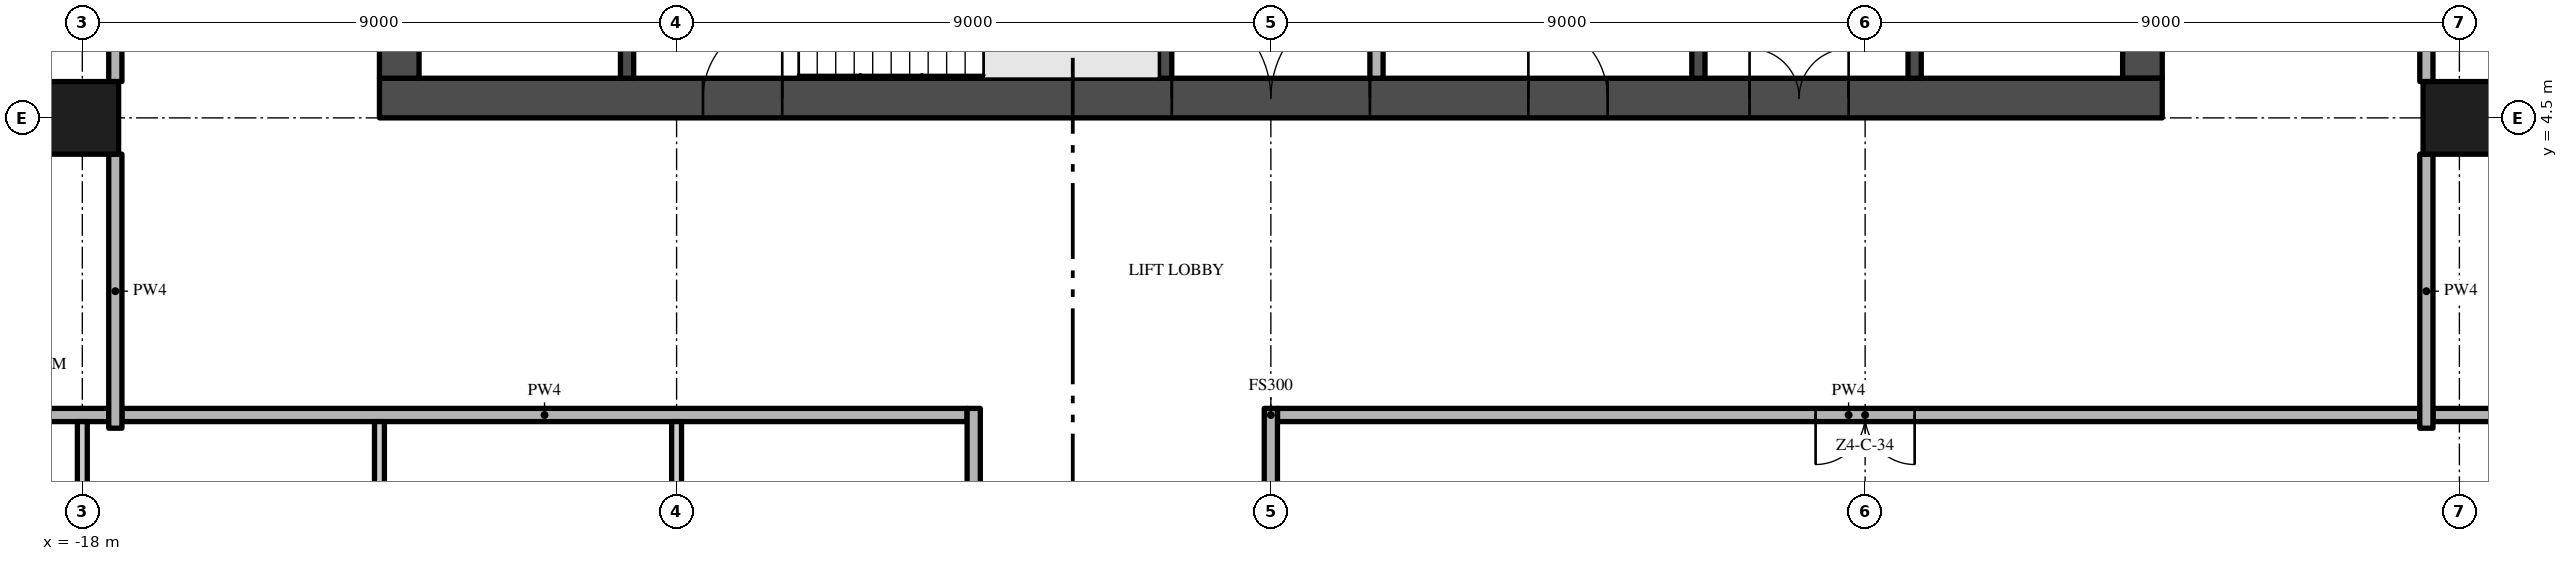
"""IFC4 building model, lengths in metres.
Left out: names, types, materials, properties, quantities, classifications, styles, units other than length and angle.
Written with IfcOpenShell. Run it as: python <this file> out.ifc"""

import sys

from ifc_helpers import new_model, si_unit, direction, frame, frame_2d, origin, origin_2d, place, context, subcontext, project, spatial, rectangle, extrude, element, fill, save


model = new_model("IFC4")
c1 = context("Model", 3, precision=1e-05, world=origin(), true_north=direction((0.0, 1.0)))
c2 = subcontext(c1, "Body", "Model", "MODEL_VIEW")
j1 = project(units=[si_unit("LENGTHUNIT", "METRE"), si_unit("PLANEANGLEUNIT", "RADIAN")], contexts=[c1])
p1 = place(None, origin())
s1 = spatial("IfcSite", under=j1, at=p1, CompositionType="ELEMENT")
p2 = place(p1, origin())
s2 = spatial("IfcBuilding", under=s1, at=p2, CompositionType="ELEMENT")
p3 = place(p2, frame((0.0, 0.0, 211.0)))
s3 = spatial("IfcBuildingStorey", under=s2, at=p3, CompositionType="ELEMENT", Elevation=211.0)
p4 = place(p3, frame((-13.5, 4.8, -0.3), z_axis=(0.0, 0.0, 1.0), x_axis=(1.0, 0.0, 0.0)))
e1 = element("IfcWall", 1, at=p4, inside=s3, PredefinedType="SHEAR", context=c2, shape_type="SweptSolid", body=[
    extrude(rectangle(XDim=27.0, YDim=0.6, at=frame_2d((13.5, 0.0))), origin(), (0.0, 0.0, 1.0), 3.8),
])
p5 = place(p4, frame((12.0, 0.0, 0.3)))
e2 = element("IfcOpeningElement", 2, at=p5, cuts=e1, PredefinedType="OPENING", context=c2, shape_type="SweptSolid", body=[
    extrude(rectangle(XDim=3.0, YDim=2.4, at=frame_2d((1.5, 1.2))), frame((0.0, 0.31, 0.0), z_axis=(0.0, -1.0, 0.0), x_axis=(1.0, 0.0, 0.0)), (0.0, 0.0, 1.0), 0.62),
])
p6 = place(p4, frame((4.9, 0.0, 0.3)))
e3 = element("IfcOpeningElement", 3, at=p6, cuts=e1, PredefinedType="OPENING", context=c2, shape_type="SweptSolid", body=[
    extrude(rectangle(XDim=1.2, YDim=2.2, at=frame_2d((0.6, 1.1))), frame((0.0, 0.31, 0.0), z_axis=(0.0, -1.0, 0.0), x_axis=(1.0, 0.0, 0.0)), (0.0, 0.0, 1.0), 0.62),
])
p7 = place(p4, frame((20.75, 0.0, 0.3)))
e4 = element("IfcOpeningElement", 4, at=p7, cuts=e1, PredefinedType="OPENING", context=c2, shape_type="SweptSolid", body=[
    extrude(rectangle(XDim=1.5, YDim=2.2, at=frame_2d((0.75, 1.1))), frame((0.0, 0.31, 0.0), z_axis=(0.0, -1.0, 0.0), x_axis=(1.0, 0.0, 0.0)), (0.0, 0.0, 1.0), 0.62),
])
p8 = place(p4, frame((17.4, 0.0, 0.3)))
e5 = element("IfcOpeningElement", 5, at=p8, cuts=e1, PredefinedType="OPENING", context=c2, shape_type="SweptSolid", body=[
    extrude(rectangle(XDim=1.2, YDim=2.2, at=frame_2d((0.6, 1.1))), frame((0.0, 0.31, 0.0), z_axis=(0.0, -1.0, 0.0), x_axis=(1.0, 0.0, 0.0)), (0.0, 0.0, 1.0), 0.62),
])
p9 = place(p3, frame((13.2, 5.1, -0.3), z_axis=(0.0, 0.0, 1.0), x_axis=(0.0, 1.0, 0.0)))
e6 = element("IfcWall", 6, at=p9, inside=s3, PredefinedType="SHEAR", context=c2, shape_type="SweptSolid", body=[
    extrude(rectangle(XDim=16.8, YDim=0.6, at=frame_2d((8.4, 0.0))), origin(), (0.0, 0.0, 1.0), 3.8),
])
p10 = place(p9, frame((6.3, 0.0, 0.3)))
e7 = element("IfcOpeningElement", 7, at=p10, cuts=e6, PredefinedType="OPENING", context=c2, shape_type="SweptSolid", body=[
    extrude(rectangle(XDim=1.2, YDim=2.2, at=frame_2d((0.6, 1.1))), frame((0.0, 0.31, 0.0), z_axis=(0.0, -1.0, 0.0), x_axis=(1.0, 0.0, 0.0)), (0.0, 0.0, 1.0), 0.62),
])
p11 = place(p3, frame((-13.2, 21.9, -0.3), z_axis=(0.0, 0.0, 1.0), x_axis=(0.0, -1.0, 0.0)))
e8 = element("IfcWall", 8, at=p11, inside=s3, PredefinedType="SHEAR", context=c2, shape_type="SweptSolid", body=[
    extrude(rectangle(XDim=16.8, YDim=0.6, at=frame_2d((8.4, 0.0))), origin(), (0.0, 0.0, 1.0), 3.8),
])
p12 = place(p11, frame((9.3, 0.0, 0.3)))
e9 = element("IfcOpeningElement", 9, at=p12, cuts=e8, PredefinedType="OPENING", context=c2, shape_type="SweptSolid", body=[
    extrude(rectangle(XDim=1.2, YDim=2.2, at=frame_2d((0.6, 1.1))), frame((0.0, 0.31, 0.0), z_axis=(0.0, -1.0, 0.0), x_axis=(1.0, 0.0, 0.0)), (0.0, 0.0, 1.0), 0.62),
])
for number, where, z_axis, x_axis in (
    (10, (-18.0, 4.5, 0.0), (0.0, 0.0, 1.0), (1.0, 0.0, 0.0)),
    (11, (18.0, 4.5, 0.0), (0.0, 0.0, 1.0), (1.0, 0.0, 0.0)),
):
    element("IfcColumn", number, at=place(p3, frame(where, z_axis=z_axis, x_axis=x_axis)), inside=s3, PredefinedType="COLUMN", context=c2, shape_type="SweptSolid", body=[
        extrude(rectangle(XDim=1.1, YDim=1.1, at=origin_2d()), origin(), (0.0, 0.0, 1.0), 3.5),
    ])
for number, where, z_axis, x_axis in (
    (12, (-9.75, 5.1, 0.0), (0.0, 0.0, 1.0), (0.0, 1.0, 0.0)),
    (13, (-1.6, 5.1, 0.0), (0.0, 0.0, 1.0), (0.0, 1.0, 0.0)),
):
    element("IfcWall", number, at=place(p3, frame(where, z_axis=z_axis, x_axis=x_axis)), inside=s3, PredefinedType="SHEAR", context=c2, shape_type="SweptSolid", body=[
        extrude(rectangle(XDim=2.85, YDim=0.2, at=frame_2d((1.425, 0.0))), origin(), (0.0, 0.0, 1.0), 3.5),
    ])
p13 = place(p3, frame((1.6, 7.5, 0.0), z_axis=(0.0, 0.0, 1.0), x_axis=(0.0, -1.0, 0.0)))
e14 = element("IfcWall", 14, at=p13, inside=s3, PredefinedType="PARTITIONING", context=c2, shape_type="SweptSolid", body=[
    extrude(rectangle(XDim=2.4, YDim=0.2, at=frame_2d((1.2, 0.0))), origin(), (0.0, 0.0, 1.0), 3.5),
])
p14 = place(p13, frame((0.35, 0.0, 0.0)))
e15 = element("IfcOpeningElement", 15, at=p14, cuts=e14, PredefinedType="OPENING", context=c2, shape_type="SweptSolid", body=[
    extrude(rectangle(XDim=0.9, YDim=2.1, at=frame_2d((0.45, 1.05))), frame((0.0, 0.11, 0.0), z_axis=(0.0, -1.0, 0.0), x_axis=(1.0, 0.0, 0.0)), (0.0, 0.0, 1.0), 0.22),
])
p15 = place(p3, frame((6.475, 5.1, 0.0), z_axis=(0.0, 0.0, 1.0), x_axis=(0.0, 1.0, 0.0)))
e16 = element("IfcWall", 16, at=p15, inside=s3, PredefinedType="SHEAR", context=c2, shape_type="SweptSolid", body=[
    extrude(rectangle(XDim=2.4, YDim=0.2, at=frame_2d((1.2, 0.0))), origin(), (0.0, 0.0, 1.0), 3.5),
])
p16 = place(p3, frame((9.75, 5.1, 0.0), z_axis=(0.0, 0.0, 1.0), x_axis=(0.0, 1.0, 0.0)))
e17 = element("IfcWall", 17, at=p16, inside=s3, PredefinedType="SHEAR", context=c2, shape_type="SweptSolid", body=[
    extrude(rectangle(XDim=2.5, YDim=0.2, at=frame_2d((1.25, 0.0))), origin(), (0.0, 0.0, 1.0), 3.5),
])
p17 = place(p16, frame((0.85, 0.0, 0.0)))
e18 = element("IfcOpeningElement", 18, at=p17, cuts=e17, PredefinedType="OPENING", context=c2, shape_type="SweptSolid", body=[
    extrude(rectangle(XDim=1.1, YDim=2.1, at=frame_2d((0.55, 1.05))), frame((0.0, 0.11, 0.0), z_axis=(0.0, -1.0, 0.0), x_axis=(1.0, 0.0, 0.0)), (0.0, 0.0, 1.0), 0.22),
])
p18 = place(p3, frame((-17.4, 0.0, 0.0), z_axis=(0.0, 0.0, 1.0), x_axis=(1.0, 0.0, 0.0)))
e19 = element("IfcWall", 19, at=p18, inside=s3, PredefinedType="PARTITIONING", context=c2, shape_type="SweptSolid", body=[
    extrude(rectangle(XDim=12.8, YDim=0.2, at=frame_2d((6.4, 0.0))), origin(), (0.0, 0.0, 1.0), 3.5),
])
p19 = place(p3, frame((17.4, 0.0, 0.0), z_axis=(0.0, 0.0, 1.0), x_axis=(-1.0, 0.0, 0.0)))
e20 = element("IfcWall", 20, at=p19, inside=s3, PredefinedType="PARTITIONING", context=c2, shape_type="SweptSolid", body=[
    extrude(rectangle(XDim=17.3, YDim=0.2, at=frame_2d((8.65, 0.0))), origin(), (0.0, 0.0, 1.0), 3.5),
])
p20 = place(p19, frame((7.65, 0.0, 0.0)))
e21 = element("IfcOpeningElement", 21, at=p20, cuts=e20, PredefinedType="OPENING", context=c2, shape_type="SweptSolid", body=[
    extrude(rectangle(XDim=1.5, YDim=2.4, at=frame_2d((0.75, 1.2))), frame((0.0, 0.11, 0.0), z_axis=(0.0, -1.0, 0.0), x_axis=(1.0, 0.0, 0.0)), (0.0, 0.0, 1.0), 0.22),
])
for number, where, z_axis, x_axis in (
    (22, (-26.7, 0.0, 0.0), (0.0, 0.0, 1.0), (1.0, 0.0, 0.0)),
    (23, (17.6, 0.0, 0.0), (0.0, 0.0, 1.0), (1.0, 0.0, 0.0)),
):
    element("IfcWall", number, at=place(p3, frame(where, z_axis=z_axis, x_axis=x_axis)), inside=s3, PredefinedType="PARTITIONING", context=c2, shape_type="SweptSolid", body=[
        extrude(rectangle(XDim=9.1, YDim=0.2, at=frame_2d((4.55, 0.0))), origin(), (0.0, 0.0, 1.0), 3.5),
    ])
p21 = place(p3, frame((-18.0, -3.95, 0.0), z_axis=(0.0, 0.0, 1.0), x_axis=(0.0, 1.0, 0.0)))
e24 = element("IfcWall", 24, at=p21, inside=s3, PredefinedType="PARTITIONING", context=c2, shape_type="SweptSolid", body=[
    extrude(rectangle(XDim=3.85, YDim=0.15, at=frame_2d((1.925, 0.0))), origin(), (0.0, 0.0, 1.0), 3.5),
])
p22 = place(p21, frame((0.15, 0.0, 0.0)))
e25 = element("IfcOpeningElement", 25, at=p22, cuts=e24, PredefinedType="OPENING", context=c2, shape_type="SweptSolid", body=[
    extrude(rectangle(XDim=1.0, YDim=2.4, at=frame_2d((0.5, 1.2))), frame((0.0, 0.085, 0.0), z_axis=(0.0, -1.0, 0.0), x_axis=(1.0, 0.0, 0.0)), (0.0, 0.0, 1.0), 0.17),
])
p23 = place(p3, frame((-17.5, -0.2, 0.0), z_axis=(0.0, 0.0, 1.0), x_axis=(0.0, 1.0, 0.0)))
e26 = element("IfcWall", 26, at=p23, inside=s3, PredefinedType="PARTITIONING", context=c2, shape_type="SweptSolid", body=[
    extrude(rectangle(XDim=4.15, YDim=0.2, at=frame_2d((2.075, 0.0))), origin(), (0.0, 0.0, 1.0), 3.5),
])
p24 = place(p3, frame((-17.5, 5.05, 0.0), z_axis=(0.0, 0.0, 1.0), x_axis=(0.0, 1.0, 0.0)))
e27 = element("IfcWall", 27, at=p24, inside=s3, PredefinedType="PARTITIONING", context=c2, shape_type="SweptSolid", body=[
    extrude(rectangle(XDim=7.9, YDim=0.2, at=frame_2d((3.95, 0.0))), origin(), (0.0, 0.0, 1.0), 3.5),
])
p25 = place(p3, frame((-13.5, -8.325, 0.0), z_axis=(0.0, 0.0, 1.0), x_axis=(0.0, 1.0, 0.0)))
e28 = element("IfcWall", 28, at=p25, inside=s3, PredefinedType="PARTITIONING", context=c2, shape_type="SweptSolid", body=[
    extrude(rectangle(XDim=8.225, YDim=0.15, at=frame_2d((4.112, 0.0))), origin(), (0.0, 0.0, 1.0), 3.5),
])
p26 = place(p3, frame((-9.0, -3.95, 0.0), z_axis=(0.0, 0.0, 1.0), x_axis=(0.0, 1.0, 0.0)))
e29 = element("IfcWall", 29, at=p26, inside=s3, PredefinedType="PARTITIONING", context=c2, shape_type="SweptSolid", body=[
    extrude(rectangle(XDim=3.85, YDim=0.15, at=frame_2d((1.925, 0.0))), origin(), (0.0, 0.0, 1.0), 3.5),
])
p27 = place(p26, frame((0.45, 0.0, 0.0)))
e30 = element("IfcOpeningElement", 30, at=p27, cuts=e29, PredefinedType="OPENING", context=c2, shape_type="SweptSolid", body=[
    extrude(rectangle(XDim=1.0, YDim=2.4, at=frame_2d((0.5, 1.2))), frame((0.0, 0.085, 0.0), z_axis=(0.0, -1.0, 0.0), x_axis=(1.0, 0.0, 0.0)), (0.0, 0.0, 1.0), 0.17),
])
p28 = place(p3, frame((-4.5, -22.2, 0.0), z_axis=(0.0, 0.0, 1.0), x_axis=(0.0, 1.0, 0.0)))
e31 = element("IfcWall", 31, at=p28, inside=s3, PredefinedType="PARTITIONING", context=c2, shape_type="SweptSolid", body=[
    extrude(rectangle(XDim=22.3, YDim=0.2, at=frame_2d((11.15, 0.0))), origin(), (0.0, 0.0, 1.0), 3.5),
])
p29 = place(p28, frame((10.2, 0.0, 0.0)))
e32 = element("IfcOpeningElement", 32, at=p29, cuts=e31, PredefinedType="OPENING", context=c2, shape_type="SweptSolid", body=[
    extrude(rectangle(XDim=1.5, YDim=2.4, at=frame_2d((0.75, 1.2))), frame((0.0, 0.11, 0.0), z_axis=(0.0, -1.0, 0.0), x_axis=(1.0, 0.0, 0.0)), (0.0, 0.0, 1.0), 0.22),
])
p30 = place(p3, frame((0.0, -3.95, 0.0), z_axis=(0.0, 0.0, 1.0), x_axis=(0.0, 1.0, 0.0)))
e33 = element("IfcWall", 33, at=p30, inside=s3, PredefinedType="PARTITIONING", context=c2, shape_type="SweptSolid", body=[
    extrude(rectangle(XDim=4.05, YDim=0.2, at=frame_2d((2.025, 0.0))), origin(), (0.0, 0.0, 1.0), 3.5),
])
p31 = place(p3, frame((17.5, -0.2, 0.0), z_axis=(0.0, 0.0, 1.0), x_axis=(0.0, 1.0, 0.0)))
e34 = element("IfcWall", 34, at=p31, inside=s3, PredefinedType="PARTITIONING", context=c2, shape_type="SweptSolid", body=[
    extrude(rectangle(XDim=4.15, YDim=0.2, at=frame_2d((2.075, 0.0))), origin(), (0.0, 0.0, 1.0), 3.5),
])
p32 = place(p3, frame((17.5, 5.05, 0.0), z_axis=(0.0, 0.0, 1.0), x_axis=(0.0, 1.0, 0.0)))
e35 = element("IfcWall", 35, at=p32, inside=s3, PredefinedType="PARTITIONING", context=c2, shape_type="SweptSolid", body=[
    extrude(rectangle(XDim=7.9, YDim=0.2, at=frame_2d((3.95, 0.0))), origin(), (0.0, 0.0, 1.0), 3.5),
])
p33 = place(p5, frame((3.0, 0.0, 0.0), z_axis=(0.0, 0.0, 1.0), x_axis=(-1.0, 0.0, 0.0)))
e36 = element("IfcDoor", 36, at=p33, inside=s3, OperationType="DOUBLE_DOOR_SINGLE_SWING", PredefinedType="DOOR", context=c2, shape_type="SweptSolid", body=[
    extrude(rectangle(XDim=3.0, YDim=2.4, at=frame_2d((1.5, 1.2))), frame((0.0, 0.025, 0.0), z_axis=(0.0, -1.0, 0.0), x_axis=(1.0, 0.0, 0.0)), (0.0, 0.0, 1.0), 0.05),
])
fill(e2, e36)
p34 = place(p6, frame((1.2, 0.0, 0.0), z_axis=(0.0, 0.0, 1.0), x_axis=(-1.0, 0.0, 0.0)))
e37 = element("IfcDoor", 37, at=p34, inside=s3, OperationType="SINGLE_SWING_LEFT", PredefinedType="DOOR", context=c2, shape_type="SweptSolid", body=[
    extrude(rectangle(XDim=1.2, YDim=2.2, at=frame_2d((0.6, 1.1))), frame((0.0, 0.025, 0.0), z_axis=(0.0, -1.0, 0.0), x_axis=(1.0, 0.0, 0.0)), (0.0, 0.0, 1.0), 0.05),
])
fill(e3, e37)
p35 = place(p7, frame((1.5, 0.0, 0.0), z_axis=(0.0, 0.0, 1.0), x_axis=(-1.0, 0.0, 0.0)))
e38 = element("IfcDoor", 38, at=p35, inside=s3, OperationType="DOUBLE_DOOR_SINGLE_SWING", PredefinedType="DOOR", context=c2, shape_type="SweptSolid", body=[
    extrude(rectangle(XDim=1.5, YDim=2.2, at=frame_2d((0.75, 1.1))), frame((0.0, 0.025, 0.0), z_axis=(0.0, -1.0, 0.0), x_axis=(1.0, 0.0, 0.0)), (0.0, 0.0, 1.0), 0.05),
])
fill(e4, e38)
p36 = place(p8, frame((1.2, 0.0, 0.0), z_axis=(0.0, 0.0, 1.0), x_axis=(-1.0, 0.0, 0.0)))
e39 = element("IfcDoor", 39, at=p36, inside=s3, OperationType="SINGLE_SWING_RIGHT", PredefinedType="DOOR", context=c2, shape_type="SweptSolid", body=[
    extrude(rectangle(XDim=1.2, YDim=2.2, at=frame_2d((0.6, 1.1))), frame((0.0, 0.025, 0.0), z_axis=(0.0, -1.0, 0.0), x_axis=(1.0, 0.0, 0.0)), (0.0, 0.0, 1.0), 0.05),
])
fill(e5, e39)
p37 = place(p20, origin())
e40 = element("IfcDoor", 40, at=p37, inside=s3, OperationType="DOUBLE_DOOR_SINGLE_SWING", PredefinedType="DOOR", context=c2, shape_type="SweptSolid", body=[
    extrude(rectangle(XDim=1.5, YDim=2.4, at=frame_2d((0.75, 1.2))), frame((0.0, 0.025, 0.0), z_axis=(0.0, -1.0, 0.0), x_axis=(1.0, 0.0, 0.0)), (0.0, 0.0, 1.0), 0.05),
])
fill(e21, e40)
save(model, sys.argv[1])
